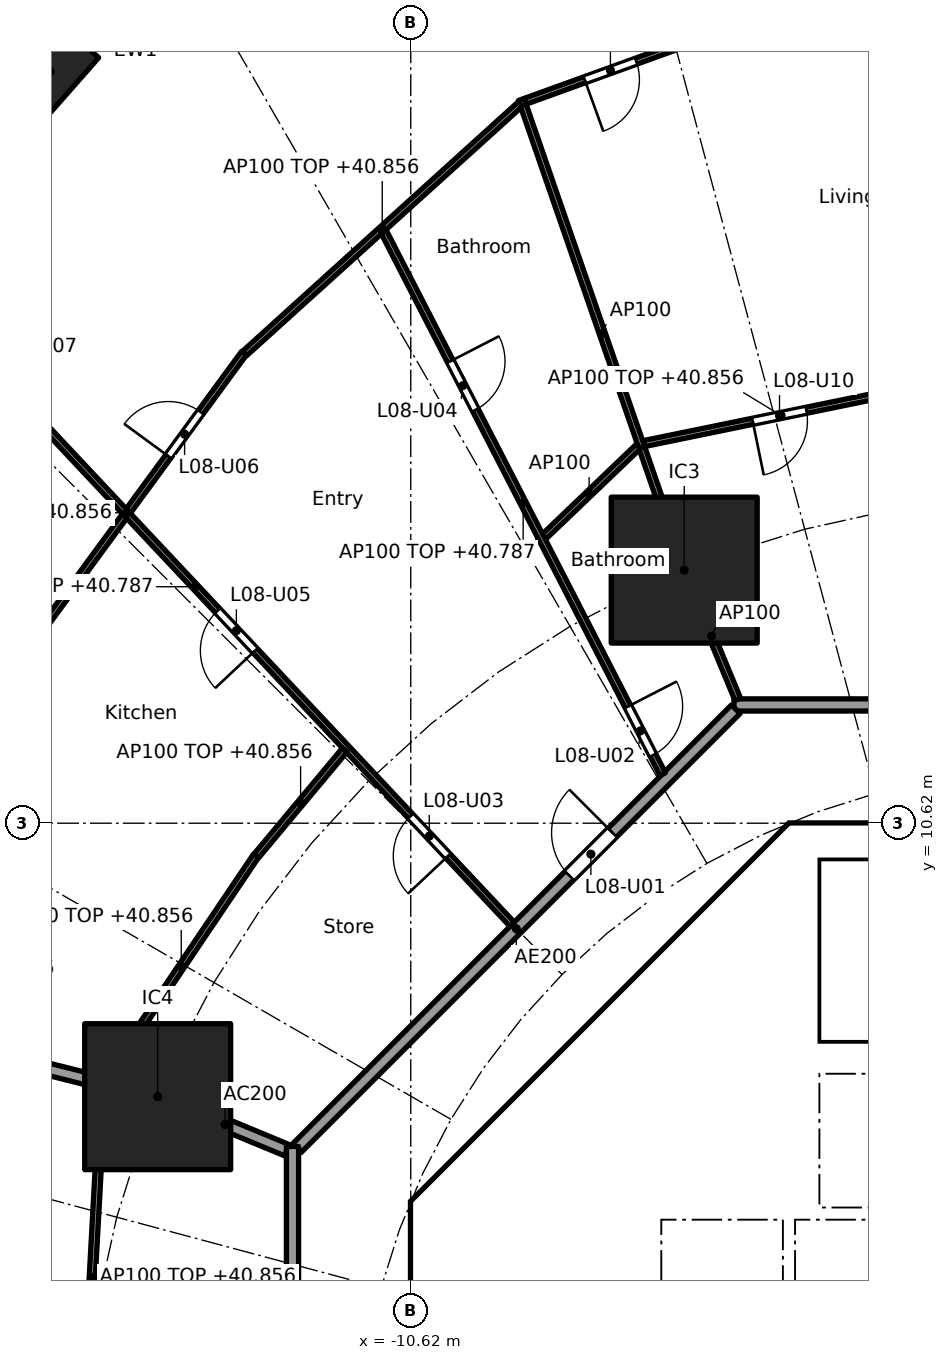
"""IFC4 building model, lengths in metres.
Left out: names, types, materials, properties, quantities, classifications, styles, units other than length and angle.
Written with IfcOpenShell. Run it as: python <this file> out.ifc"""

import sys

from ifc_helpers import new_model, si_unit, direction, frame, frame_2d, origin, origin_2d, place, context, subcontext, project, spatial, polyline, rectangle, hollow_rectangle, outline, extrude, element, fill, save


model = new_model("IFC4")
c1 = context("Model", 3, precision=1e-05, world=origin(), true_north=direction((0.0, 1.0)))
c2 = subcontext(c1, "Body", "Model", "MODEL_VIEW")
j1 = project(units=[si_unit("LENGTHUNIT", "METRE"), si_unit("PLANEANGLEUNIT", "RADIAN")], contexts=[c1])
p1 = place(None, origin())
s1 = spatial("IfcSite", under=j1, at=p1, CompositionType="ELEMENT")
p2 = place(p1, origin())
s2 = spatial("IfcBuilding", under=s1, at=p2, CompositionType="ELEMENT")
p3 = place(p2, frame((0.0, 0.0, 38.1)))
s3 = spatial("IfcBuildingStorey", under=s2, at=p3, CompositionType="ELEMENT", Elevation=38.1)
p4 = place(p3, frame((-16.552, 22.981, 0.0), z_axis=(0.0, 0.0, 1.0), x_axis=(-0.660114607735, -0.751164898445, 0.0)))
e1 = element("IfcColumn", 1, at=p4, inside=s3, PredefinedType="COLUMN", context=c2, shape_type="SweptSolid", body=[
    extrude(hollow_rectangle(XDim=1.4, YDim=0.9, WallThickness=0.05, at=origin_2d()), origin(), (0.0, 0.0, 1.0), 3.7),
])
for number, where, z_axis, x_axis in (
    (2, (-6.123, 14.782, 0.0), (0.0, 0.0, 1.0), (1.0, 0.0, 0.0)),
    (3, (-14.782, 6.123, 0.0), (0.0, 0.0, 1.0), (1.0, 0.0, 0.0)),
):
    element("IfcColumn", number, at=place(p3, frame(where, z_axis=z_axis, x_axis=x_axis)), inside=s3, PredefinedType="COLUMN", context=c2, shape_type="SweptSolid", body=[
        extrude(rectangle(XDim=2.4, YDim=2.4, at=origin_2d()), origin(), (0.0, 0.0, 1.0), 3.7),
    ])
p5 = place(p3, frame((-4.613, 9.988, 0.0), z_axis=(0.0, 0.0, 1.0), x_axis=(-0.707106781187, -0.707106781187, 0.0)))
e4 = element("IfcWall", 4, at=p5, inside=s3, PredefinedType="SHEAR", context=c2, shape_type="SweptSolid", body=[
    extrude(rectangle(XDim=7.602, YDim=0.6, at=frame_2d((3.801, 0.0))), origin(), (0.0, 0.0, 1.0), 3.44),
])
p6 = place(p5, frame((0.351, 0.0, 0.0)))
e5 = element("IfcOpeningElement", 5, at=p6, cuts=e4, PredefinedType="OPENING", context=c2, shape_type="SweptSolid", body=[
    extrude(rectangle(XDim=1.1, YDim=2.1, at=frame_2d((0.55, 1.05))), frame((0.0, 0.31, 0.0), z_axis=(0.0, -1.0, 0.0), x_axis=(1.0, 0.0, 0.0)), (0.0, 0.0, 1.0), 0.62),
])
p7 = place(p3, frame((-10.325, 3.801, 0.0), z_axis=(0.0, 0.0, 1.0), x_axis=(0.0, -1.0, 0.0)))
e6 = element("IfcWall", 6, at=p7, inside=s3, PredefinedType="SHEAR", context=c2, shape_type="SweptSolid", body=[
    extrude(rectangle(XDim=7.602, YDim=0.6, at=frame_2d((3.801, 0.0))), origin(), (0.0, 0.0, 1.0), 3.44),
])
p8 = place(p7, frame((0.651, 0.0, 0.0)))
e7 = element("IfcOpeningElement", 7, at=p8, cuts=e6, PredefinedType="OPENING", context=c2, shape_type="SweptSolid", body=[
    extrude(rectangle(XDim=1.5, YDim=2.1, at=frame_2d((0.75, 1.05))), frame((0.0, 0.31, 0.0), z_axis=(0.0, -1.0, 0.0), x_axis=(1.0, 0.0, 0.0)), (0.0, 0.0, 1.0), 0.62),
])
p9 = place(p7, frame((5.451, 0.0, 0.0)))
e8 = element("IfcOpeningElement", 8, at=p9, cuts=e6, PredefinedType="OPENING", context=c2, shape_type="SweptSolid", body=[
    extrude(rectangle(XDim=1.5, YDim=2.1, at=frame_2d((0.75, 1.05))), frame((0.0, 0.31, 0.0), z_axis=(0.0, -1.0, 0.0), x_axis=(1.0, 0.0, 0.0)), (0.0, 0.0, 1.0), 0.62),
])
p10 = place(p3, frame((-6.2, 4.3, 0.0), z_axis=(0.0, 0.0, 1.0), x_axis=(0.0, 1.0, 0.0)))
e9 = element("IfcWall", 9, at=p10, inside=s3, PredefinedType="PARTITIONING", context=c2, shape_type="SweptSolid", body=[
    extrude(rectangle(XDim=3.527, YDim=0.15, at=frame_2d((1.763, 0.0))), origin(), (0.0, 0.0, 1.0), 3.44),
])
p11 = place(p10, frame((0.262, 0.0, 0.0)))
e10 = element("IfcOpeningElement", 10, at=p11, cuts=e9, PredefinedType="OPENING", context=c2, shape_type="SweptSolid", body=[
    extrude(rectangle(XDim=0.9, YDim=2.1, at=frame_2d((0.45, 1.05))), frame((0.0, 0.085, 0.0), z_axis=(0.0, -1.0, 0.0), x_axis=(1.0, 0.0, 0.0)), (0.0, 0.0, 1.0), 0.17),
])
p12 = place(p10, frame((2.138, 0.0, 0.0)))
e11 = element("IfcOpeningElement", 11, at=p12, cuts=e9, PredefinedType="OPENING", context=c2, shape_type="SweptSolid", body=[
    extrude(rectangle(XDim=0.9, YDim=2.1, at=frame_2d((0.45, 1.05))), frame((0.0, 0.085, 0.0), z_axis=(0.0, -1.0, 0.0), x_axis=(1.0, 0.0, 0.0)), (0.0, 0.0, 1.0), 0.17),
])
p13 = place(p3, frame((-4.0, 4.3, 0.0), z_axis=(0.0, 0.0, 1.0), x_axis=(0.0, 1.0, 0.0)))
e12 = element("IfcWall", 12, at=p13, inside=s3, PredefinedType="SOLIDWALL", context=c2, shape_type="SweptSolid", body=[
    extrude(rectangle(XDim=2.2, YDim=0.2, at=frame_2d((1.1, 0.0))), origin(), (0.0, 0.0, 1.0), 3.44),
])
p14 = place(p13, frame((0.55, 0.0, 0.0)))
e13 = element("IfcOpeningElement", 13, at=p14, cuts=e12, PredefinedType="OPENING", context=c2, shape_type="SweptSolid", body=[
    extrude(rectangle(XDim=1.1, YDim=2.1, at=frame_2d((0.55, 1.05))), frame((0.0, 0.11, 0.0), z_axis=(0.0, -1.0, 0.0), x_axis=(1.0, 0.0, 0.0)), (0.0, 0.0, 1.0), 0.22),
])
p15 = place(p3, origin())
e14 = element("IfcWall", 14, at=p15, inside=s3, PredefinedType="SHEAR", context=c2, shape_type="SweptSolid", body=[
    extrude(outline(polyline([(-10.2, 4.825), (-9.776, 4.401), (-10.025, 4.152), (-10.025, 3.801), (-10.625, 3.801), (-10.625, 4.401), (-10.2, 4.825)])), origin(), (0.0, 0.0, 1.0), 3.44),
])
p16 = place(p3, origin())
e15 = element("IfcWall", 15, at=p16, inside=s3, PredefinedType="SHEAR", context=c2, shape_type="SweptSolid", body=[
    extrude(outline(polyline([(-4.152, 10.025), (-4.401, 9.776), (-4.825, 10.2), (-4.401, 10.625), (4.401, 10.625), (4.825, 10.2), (4.401, 9.776), (4.152, 10.025), (-4.152, 10.025)])), origin(), (0.0, 0.0, 1.0), 3.44),
])
p17 = place(p3, frame((-10.025, 4.0, 0.0), z_axis=(0.0, 0.0, 1.0), x_axis=(1.0, 0.0, 0.0)))
e16 = element("IfcWall", 16, at=p17, inside=s3, PredefinedType="PARTITIONING", context=c2, shape_type="SweptSolid", body=[
    extrude(rectangle(XDim=3.325, YDim=0.2, at=frame_2d((1.662, 0.0))), origin(), (0.0, 0.0, 1.0), 3.44),
])
p18 = place(p3, frame((-8.301, 5.8, 0.0), z_axis=(0.0, 0.0, 1.0), x_axis=(1.0, 0.0, 0.0)))
e17 = element("IfcWall", 17, at=p18, inside=s3, PredefinedType="PARTITIONING", context=c2, shape_type="SweptSolid", body=[
    extrude(rectangle(XDim=2.026, YDim=0.15, at=frame_2d((1.013, 0.0))), origin(), (0.0, 0.0, 1.0), 3.44),
])
p19 = place(p3, origin())
e18 = element("IfcWall", 18, at=p19, inside=s3, PredefinedType="SOLIDWALL", context=c2, shape_type="SweptSolid", body=[
    extrude(outline(polyline([(-6.5, 2.1), (-6.7, 2.1), (-6.7, 4.3), (6.7, 4.3), (6.7, 2.1), (6.5, 2.1), (6.5, 4.1), (4.5, 4.1), (4.5, 2.1), (4.3, 2.1), (4.3, 4.1), (2.3, 4.1), (2.3, 2.1), (2.1, 2.1), (2.1, 4.1), (0.1, 4.1), (0.1, 2.1), (-0.1, 2.1), (-0.1, 4.1), (-2.1, 4.1), (-2.1, 2.1), (-2.3, 2.1), (-2.3, 4.1), (-4.3, 4.1), (-4.3, 2.1), (-4.5, 2.1), (-4.5, 4.1), (-6.5, 4.1), (-6.5, 2.1)])), origin(), (0.0, 0.0, 1.0), 3.44),
])
p20 = place(p3, origin())
e19 = element("IfcWall", 19, at=p20, inside=s3, PredefinedType="SOLIDWALL", context=c2, shape_type="SweptSolid", body=[
    extrude(outline(polyline([(-3.9, 7.025), (-4.1, 7.025), (-4.1, 10.025), (-3.9, 10.025), (-3.9, 7.025)])), origin(), (0.0, 0.0, 1.0), 3.44),
])
p21 = place(p3, origin())
e20 = element("IfcWall", 20, at=p21, inside=s3, PredefinedType="SOLIDWALL", context=c2, shape_type="SweptSolid", body=[
    extrude(outline(polyline([(4.1, 6.5), (-4.1, 6.5), (-4.1, 7.025), (4.1, 7.025), (4.1, 6.5)])), origin(), (0.0, 0.0, 1.0), 3.44),
])
p22 = place(p3, frame((-12.657, 5.243, 0.0), z_axis=(0.0, 0.0, 1.0), x_axis=(-0.923885664896, 0.382668627144, 0.0)))
e21 = element("IfcWall", 21, at=p22, inside=s3, PredefinedType="PARTITIONING", context=c2, shape_type="SweptSolid", body=[
    extrude(rectangle(XDim=2.2, YDim=0.2, at=frame_2d((1.1, 0.0))), origin(), (0.0, 0.0, 1.0), 3.44),
])
p23 = place(p3, frame((-14.831, 6.135, 0.0), z_axis=(0.0, 0.0, 1.0), x_axis=(-0.969884949569, 0.243563512454, 0.0)))
e22 = element("IfcWall", 22, at=p23, inside=s3, PredefinedType="PARTITIONING", context=c2, shape_type="SweptSolid", body=[
    extrude(rectangle(XDim=8.829, YDim=0.2, at=frame_2d((4.415, 0.0))), origin(), (0.0, 0.0, 1.0), 2.756),
])
p24 = place(p3, frame((5.104, 12.565, 0.0), z_axis=(0.0, 0.0, 1.0), x_axis=(-1.0, 0.0, 0.0)))
e23 = element("IfcWall", 23, at=p24, inside=s3, PredefinedType="PARTITIONING", context=c2, shape_type="SweptSolid", body=[
    extrude(rectangle(XDim=10.409, YDim=0.2, at=frame_2d((5.205, 0.0))), origin(), (0.0, 0.0, 1.0), 3.44),
])
p25 = place(p3, frame((-5.275, 12.494, 0.0), z_axis=(0.0, 0.0, 1.0), x_axis=(-0.707106781187, -0.707106781187, 0.0)))
e24 = element("IfcWall", 24, at=p25, inside=s3, PredefinedType="PARTITIONING", context=c2, shape_type="SweptSolid", body=[
    extrude(rectangle(XDim=10.209, YDim=0.2, at=frame_2d((5.104, 0.0))), origin(), (0.0, 0.0, 1.0), 3.44),
])
p26 = place(p25, frame((2.87, 0.0, 0.0)))
e25 = element("IfcOpeningElement", 25, at=p26, cuts=e24, PredefinedType="OPENING", context=c2, shape_type="SweptSolid", body=[
    extrude(rectangle(XDim=1.0, YDim=2.1, at=frame_2d((0.5, 1.05))), frame((0.0, 0.11, 0.0), z_axis=(0.0, -1.0, 0.0), x_axis=(1.0, 0.0, 0.0)), (0.0, 0.0, 1.0), 0.22),
])
p27 = place(p3, frame((-12.565, 5.304, 0.0), z_axis=(0.0, 0.0, 1.0), x_axis=(0.0, -1.0, 0.0)))
e26 = element("IfcWall", 26, at=p27, inside=s3, PredefinedType="PARTITIONING", context=c2, shape_type="SweptSolid", body=[
    extrude(rectangle(XDim=10.409, YDim=0.2, at=frame_2d((5.205, 0.0))), origin(), (0.0, 0.0, 1.0), 3.44),
])
p28 = place(p3, frame((-2.272, 17.789, 0.0), z_axis=(0.0, 0.0, 1.0), x_axis=(-0.979587203416, -0.2010196779, 0.0)))
e27 = element("IfcWall", 27, at=p28, inside=s3, PredefinedType="PARTITIONING", context=c2, shape_type="SweptSolid", body=[
    extrude(rectangle(XDim=4.613, YDim=0.1, at=frame_2d((2.306, 0.0))), origin(), (0.0, 0.0, 1.0), 2.756),
])
p29 = place(p28, frame((1.881, 0.0, 0.0)))
e28 = element("IfcOpeningElement", 28, at=p29, cuts=e27, PredefinedType="OPENING", context=c2, shape_type="SweptSolid", body=[
    extrude(rectangle(XDim=0.9, YDim=2.1, at=frame_2d((0.45, 1.05))), frame((0.0, 0.06, 0.0), z_axis=(0.0, -1.0, 0.0), x_axis=(1.0, 0.0, 0.0)), (0.0, 0.0, 1.0), 0.12),
])
p30 = place(p3, frame((-3.034, 24.554, 0.0), z_axis=(0.0, 0.0, 1.0), x_axis=(-0.940401691072, -0.340065669288, 0.0)))
e29 = element("IfcWall", 29, at=p30, inside=s3, PredefinedType="PARTITIONING", context=c2, shape_type="SweptSolid", body=[
    extrude(rectangle(XDim=6.067, YDim=0.1, at=frame_2d((3.034, 0.0))), origin(), (0.0, 0.0, 1.0), 2.756),
])
p31 = place(p30, frame((4.125, 0.0, 0.0)))
e30 = element("IfcOpeningElement", 30, at=p31, cuts=e29, PredefinedType="OPENING", context=c2, shape_type="SweptSolid", body=[
    extrude(rectangle(XDim=0.9, YDim=2.1, at=frame_2d((0.45, 1.05))), frame((0.0, 0.06, 0.0), z_axis=(0.0, -1.0, 0.0), x_axis=(1.0, 0.0, 0.0)), (0.0, 0.0, 1.0), 0.12),
])
p32 = place(p3, frame((-5.243, 12.657, 0.0), z_axis=(0.0, 0.0, 1.0), x_axis=(-0.382719158442, 0.923864733477, 0.0)))
e31 = element("IfcWall", 31, at=p32, inside=s3, PredefinedType="PARTITIONING", context=c2, shape_type="SweptSolid", body=[
    extrude(rectangle(XDim=2.25, YDim=0.1, at=frame_2d((1.125, 0.0))), origin(), (0.0, 0.0, 1.0), 3.44),
])
p33 = place(p3, frame((-6.139, 14.829, 0.0), z_axis=(0.0, 0.0, 1.0), x_axis=(-0.327183700812, 0.944960753642, 0.0)))
e32 = element("IfcWall", 32, at=p33, inside=s3, PredefinedType="PARTITIONING", context=c2, shape_type="SweptSolid", body=[
    extrude(rectangle(XDim=8.14, YDim=0.1, at=frame_2d((4.07, 0.0))), origin(), (0.0, 0.0, 1.0), 3.44),
])
p34 = place(p3, frame((-6.876, 16.817, 0.0), z_axis=(0.0, 0.0, 1.0), x_axis=(-0.722762371977, -0.691096631199, 0.0)))
e33 = element("IfcWall", 33, at=p34, inside=s3, PredefinedType="PARTITIONING", context=c2, shape_type="SweptSolid", body=[
    extrude(rectangle(XDim=2.244, YDim=0.1, at=frame_2d((1.122, 0.0))), origin(), (0.0, 0.0, 1.0), 3.44),
])
p35 = place(p3, frame((-8.823, 22.441, 0.0), z_axis=(0.0, 0.0, 1.0), x_axis=(-0.741722263338, -0.670707152242, 0.0)))
e34 = element("IfcWall", 34, at=p35, inside=s3, PredefinedType="PARTITIONING", context=c2, shape_type="SweptSolid", body=[
    extrude(rectangle(XDim=6.109, YDim=0.1, at=frame_2d((3.055, 0.0))), origin(), (0.0, 0.0, 1.0), 2.756),
])
p36 = place(p3, frame((-6.477, 11.427, 0.0), z_axis=(0.0, 0.0, 1.0), x_axis=(-0.457464037982, 0.889228122561, 0.0)))
e35 = element("IfcWall", 35, at=p36, inside=s3, PredefinedType="PARTITIONING", context=c2, shape_type="SweptSolid", body=[
    extrude(rectangle(XDim=10.032, YDim=0.1, at=frame_2d((5.016, 0.0))), origin(), (0.0, 0.0, 1.0), 2.687),
])
p37 = place(p36, frame((0.35, 0.0, 0.0)))
e36 = element("IfcOpeningElement", 36, at=p37, cuts=e35, PredefinedType="OPENING", context=c2, shape_type="SweptSolid", body=[
    extrude(rectangle(XDim=0.9, YDim=2.1, at=frame_2d((0.45, 1.05))), frame((0.0, 0.06, 0.0), z_axis=(0.0, -1.0, 0.0), x_axis=(1.0, 0.0, 0.0)), (0.0, 0.0, 1.0), 0.12),
])
p38 = place(p36, frame((6.735, 0.0, 0.0)))
e37 = element("IfcOpeningElement", 37, at=p38, cuts=e35, PredefinedType="OPENING", context=c2, shape_type="SweptSolid", body=[
    extrude(rectangle(XDim=0.9, YDim=2.1, at=frame_2d((0.45, 1.05))), frame((0.0, 0.06, 0.0), z_axis=(0.0, -1.0, 0.0), x_axis=(1.0, 0.0, 0.0)), (0.0, 0.0, 1.0), 0.12),
])
p39 = place(p3, frame((-13.362, 18.35, 0.0), z_axis=(0.0, 0.0, 1.0), x_axis=(-0.591191311491, -0.806531359104, 0.0)))
e38 = element("IfcWall", 38, at=p39, inside=s3, PredefinedType="PARTITIONING", context=c2, shape_type="SweptSolid", body=[
    extrude(rectangle(XDim=6.51, YDim=0.1, at=frame_2d((3.255, 0.0))), origin(), (0.0, 0.0, 1.0), 2.756),
])
p40 = place(p39, frame((1.202, 0.0, 0.0)))
e39 = element("IfcOpeningElement", 39, at=p40, cuts=e38, PredefinedType="OPENING", context=c2, shape_type="SweptSolid", body=[
    extrude(rectangle(XDim=0.9, YDim=2.1, at=frame_2d((0.45, 1.05))), frame((0.0, 0.06, 0.0), z_axis=(0.0, -1.0, 0.0), x_axis=(1.0, 0.0, 0.0)), (0.0, 0.0, 1.0), 0.12),
])
p41 = place(p3, frame((-8.953, 8.958, 0.0), z_axis=(0.0, 0.0, 1.0), x_axis=(-0.684574307023, 0.728943082939, 0.0)))
e40 = element("IfcWall", 40, at=p41, inside=s3, PredefinedType="PARTITIONING", context=c2, shape_type="SweptSolid", body=[
    extrude(rectangle(XDim=15.231, YDim=0.1, at=frame_2d((7.615, 0.0))), origin(), (0.0, 0.0, 1.0), 2.687),
])
p42 = place(p41, frame((1.54, 0.0, 0.0)))
e41 = element("IfcOpeningElement", 41, at=p42, cuts=e40, PredefinedType="OPENING", context=c2, shape_type="SweptSolid", body=[
    extrude(rectangle(XDim=0.9, YDim=2.1, at=frame_2d((0.45, 1.05))), frame((0.0, 0.06, 0.0), z_axis=(0.0, -1.0, 0.0), x_axis=(1.0, 0.0, 0.0)), (0.0, 0.0, 1.0), 0.12),
])
p43 = place(p41, frame((6.174, 0.0, 0.0)))
e42 = element("IfcOpeningElement", 42, at=p43, cuts=e40, PredefinedType="OPENING", context=c2, shape_type="SweptSolid", body=[
    extrude(rectangle(XDim=0.9, YDim=2.1, at=frame_2d((0.45, 1.05))), frame((0.0, 0.06, 0.0), z_axis=(0.0, -1.0, 0.0), x_axis=(1.0, 0.0, 0.0)), (0.0, 0.0, 1.0), 0.12),
])
p44 = place(p41, frame((11.8, 0.0, 0.0)))
e43 = element("IfcOpeningElement", 43, at=p44, cuts=e40, PredefinedType="OPENING", context=c2, shape_type="SweptSolid", body=[
    extrude(rectangle(XDim=0.9, YDim=2.1, at=frame_2d((0.45, 1.05))), frame((0.0, 0.06, 0.0), z_axis=(0.0, -1.0, 0.0), x_axis=(1.0, 0.0, 0.0)), (0.0, 0.0, 1.0), 0.12),
])
p45 = place(p3, frame((-11.705, 11.825, 0.0), z_axis=(0.0, 0.0, 1.0), x_axis=(-0.640861724905, -0.767656335577, 0.0)))
e44 = element("IfcWall", 44, at=p45, inside=s3, PredefinedType="PARTITIONING", context=c2, shape_type="SweptSolid", body=[
    extrude(rectangle(XDim=2.268, YDim=0.1, at=frame_2d((1.134, 0.0))), origin(), (0.0, 0.0, 1.0), 2.756),
])
p46 = place(p3, frame((-13.162, 10.087, 0.0), z_axis=(0.0, 0.0, 1.0), x_axis=(-0.55912750241, -0.829081682375, 0.0)))
e45 = element("IfcWall", 45, at=p46, inside=s3, PredefinedType="PARTITIONING", context=c2, shape_type="SweptSolid", body=[
    extrude(rectangle(XDim=4.408, YDim=0.1, at=frame_2d((2.204, 0.0))), origin(), (0.0, 0.0, 1.0), 2.756),
])
p47 = place(p3, frame((-15.688, 6.249, 0.0), z_axis=(0.0, 0.0, 1.0), x_axis=(-0.054659814056, -0.998505034903, 0.0)))
e46 = element("IfcWall", 46, at=p47, inside=s3, PredefinedType="PARTITIONING", context=c2, shape_type="SweptSolid", body=[
    extrude(rectangle(XDim=6.208, YDim=0.1, at=frame_2d((3.104, 0.0))), origin(), (0.0, 0.0, 1.0), 2.756),
])
p48 = place(p14, origin())
e47 = element("IfcDoor", 47, at=p48, inside=s3, OperationType="DOUBLE_DOOR_SLIDING", PredefinedType="DOOR", context=c2, shape_type="SweptSolid", body=[
    extrude(rectangle(XDim=1.1, YDim=2.1, at=frame_2d((0.55, 1.05))), frame((0.0, 0.025, 0.0), z_axis=(0.0, -1.0, 0.0), x_axis=(1.0, 0.0, 0.0)), (0.0, 0.0, 1.0), 0.05),
])
fill(e13, e47)
p49 = place(p11, origin())
e48 = element("IfcDoor", 48, at=p49, inside=s3, OperationType="SINGLE_SWING_LEFT", PredefinedType="DOOR", context=c2, shape_type="SweptSolid", body=[
    extrude(rectangle(XDim=0.9, YDim=2.1, at=frame_2d((0.45, 1.05))), frame((0.0, 0.025, 0.0), z_axis=(0.0, -1.0, 0.0), x_axis=(1.0, 0.0, 0.0)), (0.0, 0.0, 1.0), 0.05),
])
fill(e10, e48)
p50 = place(p12, origin())
e49 = element("IfcDoor", 49, at=p50, inside=s3, OperationType="SINGLE_SWING_LEFT", PredefinedType="DOOR", context=c2, shape_type="SweptSolid", body=[
    extrude(rectangle(XDim=0.9, YDim=2.1, at=frame_2d((0.45, 1.05))), frame((0.0, 0.025, 0.0), z_axis=(0.0, -1.0, 0.0), x_axis=(1.0, 0.0, 0.0)), (0.0, 0.0, 1.0), 0.05),
])
fill(e11, e49)
p51 = place(p8, origin())
e50 = element("IfcDoor", 50, at=p51, inside=s3, OperationType="DOUBLE_DOOR_SINGLE_SWING", PredefinedType="DOOR", context=c2, shape_type="SweptSolid", body=[
    extrude(rectangle(XDim=1.5, YDim=2.1, at=frame_2d((0.75, 1.05))), frame((0.0, 0.025, 0.0), z_axis=(0.0, -1.0, 0.0), x_axis=(1.0, 0.0, 0.0)), (0.0, 0.0, 1.0), 0.05),
])
fill(e7, e50)
p52 = place(p6, origin())
e51 = element("IfcDoor", 51, at=p52, inside=s3, OperationType="SINGLE_SWING_RIGHT", PredefinedType="DOOR", context=c2, shape_type="SweptSolid", body=[
    extrude(rectangle(XDim=1.1, YDim=2.1, at=frame_2d((0.55, 1.05))), frame((0.0, 0.025, 0.0), z_axis=(0.0, -1.0, 0.0), x_axis=(1.0, 0.0, 0.0)), (0.0, 0.0, 1.0), 0.05),
])
fill(e5, e51)
p53 = place(p26, frame((1.0, 0.0, 0.0), x_axis=(-1.0, 0.0, 0.0)))
e52 = element("IfcDoor", 52, at=p53, inside=s3, OperationType="SINGLE_SWING_RIGHT", PredefinedType="DOOR", context=c2, shape_type="SweptSolid", body=[
    extrude(rectangle(XDim=1.0, YDim=2.1, at=frame_2d((0.5, 1.05))), frame((0.0, 0.025, 0.0), z_axis=(0.0, -1.0, 0.0), x_axis=(1.0, 0.0, 0.0)), (0.0, 0.0, 1.0), 0.05),
])
fill(e25, e52)
p54 = place(p37, frame((0.9, 0.0, 0.0), x_axis=(-1.0, 0.0, 0.0)))
e53 = element("IfcDoor", 53, at=p54, inside=s3, OperationType="SINGLE_SWING_LEFT", PredefinedType="DOOR", context=c2, shape_type="SweptSolid", body=[
    extrude(rectangle(XDim=0.9, YDim=2.1, at=frame_2d((0.45, 1.05))), frame((0.0, 0.025, 0.0), z_axis=(0.0, -1.0, 0.0), x_axis=(1.0, 0.0, 0.0)), (0.0, 0.0, 1.0), 0.05),
])
fill(e36, e53)
p55 = place(p42, origin())
e54 = element("IfcDoor", 54, at=p55, inside=s3, OperationType="SINGLE_SWING_LEFT", PredefinedType="DOOR", context=c2, shape_type="SweptSolid", body=[
    extrude(rectangle(XDim=0.9, YDim=2.1, at=frame_2d((0.45, 1.05))), frame((0.0, 0.025, 0.0), z_axis=(0.0, -1.0, 0.0), x_axis=(1.0, 0.0, 0.0)), (0.0, 0.0, 1.0), 0.05),
])
fill(e41, e54)
p56 = place(p38, frame((0.9, 0.0, 0.0), x_axis=(-1.0, 0.0, 0.0)))
e55 = element("IfcDoor", 55, at=p56, inside=s3, OperationType="SINGLE_SWING_LEFT", PredefinedType="DOOR", context=c2, shape_type="SweptSolid", body=[
    extrude(rectangle(XDim=0.9, YDim=2.1, at=frame_2d((0.45, 1.05))), frame((0.0, 0.025, 0.0), z_axis=(0.0, -1.0, 0.0), x_axis=(1.0, 0.0, 0.0)), (0.0, 0.0, 1.0), 0.05),
])
fill(e37, e55)
p57 = place(p43, origin())
e56 = element("IfcDoor", 56, at=p57, inside=s3, OperationType="SINGLE_SWING_LEFT", PredefinedType="DOOR", context=c2, shape_type="SweptSolid", body=[
    extrude(rectangle(XDim=0.9, YDim=2.1, at=frame_2d((0.45, 1.05))), frame((0.0, 0.025, 0.0), z_axis=(0.0, -1.0, 0.0), x_axis=(1.0, 0.0, 0.0)), (0.0, 0.0, 1.0), 0.05),
])
fill(e42, e56)
p58 = place(p40, frame((0.9, 0.0, 0.0), x_axis=(-1.0, 0.0, 0.0)))
e57 = element("IfcDoor", 57, at=p58, inside=s3, OperationType="SINGLE_SWING_LEFT", PredefinedType="DOOR", context=c2, shape_type="SweptSolid", body=[
    extrude(rectangle(XDim=0.9, YDim=2.1, at=frame_2d((0.45, 1.05))), frame((0.0, 0.025, 0.0), z_axis=(0.0, -1.0, 0.0), x_axis=(1.0, 0.0, 0.0)), (0.0, 0.0, 1.0), 0.05),
])
fill(e39, e57)
p59 = place(p31, origin())
e58 = element("IfcDoor", 58, at=p59, inside=s3, OperationType="SINGLE_SWING_RIGHT", PredefinedType="DOOR", context=c2, shape_type="SweptSolid", body=[
    extrude(rectangle(XDim=0.9, YDim=2.1, at=frame_2d((0.45, 1.05))), frame((0.0, 0.025, 0.0), z_axis=(0.0, -1.0, 0.0), x_axis=(1.0, 0.0, 0.0)), (0.0, 0.0, 1.0), 0.05),
])
fill(e30, e58)
p60 = place(p29, origin())
e59 = element("IfcDoor", 59, at=p60, inside=s3, OperationType="SINGLE_SWING_RIGHT", PredefinedType="DOOR", context=c2, shape_type="SweptSolid", body=[
    extrude(rectangle(XDim=0.9, YDim=2.1, at=frame_2d((0.45, 1.05))), frame((0.0, 0.025, 0.0), z_axis=(0.0, -1.0, 0.0), x_axis=(1.0, 0.0, 0.0)), (0.0, 0.0, 1.0), 0.05),
])
fill(e28, e59)
save(model, sys.argv[1])
